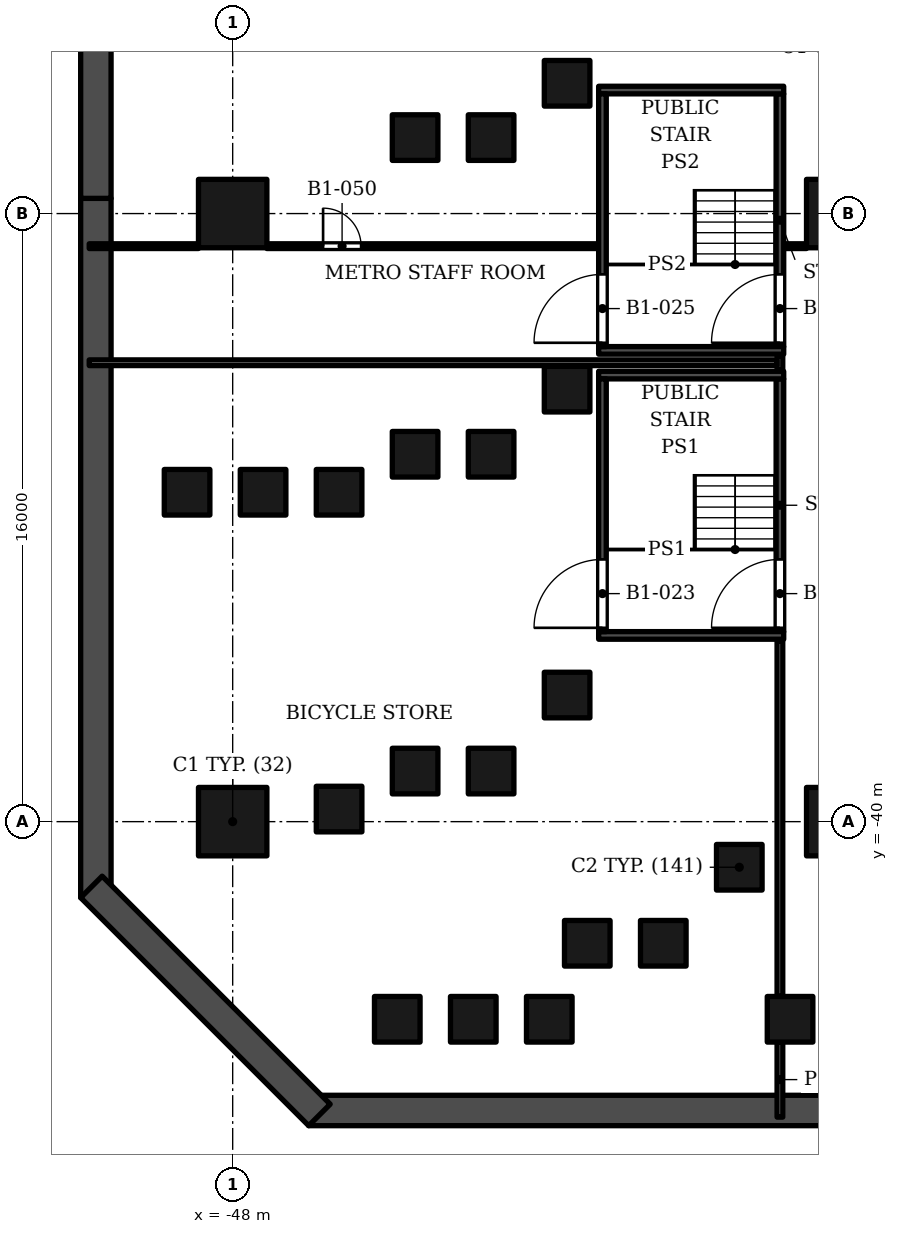
"""IFC4 building model, lengths in metres.
Left out: names, types, materials, properties, quantities, classifications, styles, units other than length and angle.
Written with IfcOpenShell. Run it as: python <this file> out.ifc"""

import sys

from ifc_helpers import new_model, si_unit, direction, frame, frame_2d, origin, origin_2d, place, context, subcontext, project, spatial, rectangle, extrude, element, fill, save


model = new_model("IFC4")
c1 = context("Model", 3, precision=1e-05, world=origin(), true_north=direction((0.0, 1.0)))
c2 = subcontext(c1, "Body", "Model", "MODEL_VIEW")
j1 = project(units=[si_unit("LENGTHUNIT", "METRE"), si_unit("PLANEANGLEUNIT", "RADIAN")], contexts=[c1])
p1 = place(None, origin())
s1 = spatial("IfcSite", under=j1, at=p1, CompositionType="ELEMENT")
p2 = place(p1, origin())
s2 = spatial("IfcBuilding", under=s1, at=p2, CompositionType="ELEMENT")
p3 = place(p2, frame((0.0, 0.0, -5.0)))
s3 = spatial("IfcBuildingStorey", under=s2, at=p3, CompositionType="ELEMENT", Elevation=-5.0)
p4 = place(p3, frame((-51.6, -23.6, 0.0), z_axis=(0.0, 0.0, 1.0), x_axis=(0.0, 1.0, 0.0)))
e1 = element("IfcWall", 1, at=p4, inside=s3, PredefinedType="SHEAR", context=c2, shape_type="SweptSolid", body=[
    extrude(rectangle(XDim=12.0, YDim=0.8, at=frame_2d((6.0, 0.0))), origin(), (0.0, 0.0, 1.0), 5.0),
])
p5 = place(p4, frame((4.0, 0.0, 0.0)))
e2 = element("IfcOpeningElement", 2, at=p5, cuts=e1, PredefinedType="OPENING", context=c2, shape_type="SweptSolid", body=[
    extrude(rectangle(XDim=4.0, YDim=2.5, at=frame_2d((2.0, 1.25))), frame((0.0, 0.41, 0.0), z_axis=(0.0, -1.0, 0.0), x_axis=(1.0, 0.0, 0.0)), (0.0, 0.0, 1.0), 0.82),
])
p6 = place(p3, frame((-51.6, -23.6, 0.0), z_axis=(0.0, 0.0, 1.0), x_axis=(0.0, -1.0, 0.0)))
e3 = element("IfcWall", 3, at=p6, inside=s3, PredefinedType="SHEAR", context=c2, shape_type="SweptSolid", body=[
    extrude(rectangle(XDim=18.4, YDim=0.8, at=frame_2d((9.2, 0.0))), origin(), (0.0, 0.0, 1.0), 5.0),
])
p7 = place(p3, frame((-51.717, -41.717, 0.0), z_axis=(0.0, 0.0, 1.0), x_axis=(0.707106781187, -0.707106781187, 0.0)))
e4 = element("IfcWall", 4, at=p7, inside=s3, PredefinedType="SHEAR", context=c2, shape_type="SweptSolid", body=[
    extrude(rectangle(XDim=8.485, YDim=0.8, at=frame_2d((4.243, 0.0))), origin(), (0.0, 0.0, 1.0), 5.0),
])
p8 = place(p3, frame((-46.0, -47.6, 0.0), z_axis=(0.0, 0.0, 1.0), x_axis=(1.0, 0.0, 0.0)))
e5 = element("IfcWall", 5, at=p8, inside=s3, PredefinedType="SHEAR", context=c2, shape_type="SweptSolid", body=[
    extrude(rectangle(XDim=92.0, YDim=0.8, at=frame_2d((46.0, 0.0))), origin(), (0.0, 0.0, 1.0), 5.0),
])
for number, where, z_axis, x_axis in (
    (6, (-48.0, -40.0, 0.0), (0.0, 0.0, 1.0), (1.0, 0.0, 0.0)),
    (7, (-48.0, -24.0, 0.0), (0.0, 0.0, 1.0), (1.0, 0.0, 0.0)),
    (8, (-32.0, -40.0, 0.0), (0.0, 0.0, 1.0), (1.0, 0.0, 0.0)),
    (9, (-32.0, -24.0, 0.0), (0.0, 0.0, 1.0), (1.0, 0.0, 0.0)),
):
    element("IfcColumn", number, at=place(p3, frame(where, z_axis=z_axis, x_axis=x_axis)), inside=s3, PredefinedType="COLUMN", context=c2, shape_type="SweptSolid", body=[
        extrude(rectangle(XDim=1.8, YDim=1.8, at=origin_2d()), origin(), (0.0, 0.0, 1.0), 5.0),
    ])
for number, where, z_axis, x_axis in (
    (10, (-34.669, -41.2, 0.0), (0.0, 0.0, 1.0), (1.0, 0.0, 0.0)),
    (11, (-39.2, -36.669, 0.0), (0.0, 0.0, 1.0), (1.0, 0.0, 0.0)),
    (12, (-39.2, -28.62, 0.0), (0.0, 0.0, 1.0), (1.0, 0.0, 0.0)),
    (13, (-39.2, -20.572, 0.0), (0.0, 0.0, 1.0), (1.0, 0.0, 0.0)),
    (14, (-36.669, -43.2, 0.0), (0.0, 0.0, 1.0), (1.0, 0.0, 0.0)),
    (15, (-41.2, -38.669, 0.0), (0.0, 0.0, 1.0), (1.0, 0.0, 0.0)),
    (16, (-41.2, -30.333, 0.0), (0.0, 0.0, 1.0), (1.0, 0.0, 0.0)),
    (17, (-41.2, -22.001, 0.0), (0.0, 0.0, 1.0), (1.0, 0.0, 0.0)),
    (18, (-38.669, -43.2, 0.0), (0.0, 0.0, 1.0), (1.0, 0.0, 0.0)),
    (19, (-43.2, -38.669, 0.0), (0.0, 0.0, 1.0), (1.0, 0.0, 0.0)),
    (20, (-43.2, -30.333, 0.0), (0.0, 0.0, 1.0), (1.0, 0.0, 0.0)),
    (21, (-43.2, -22.001, 0.0), (0.0, 0.0, 1.0), (1.0, 0.0, 0.0)),
    (22, (-39.669, -45.2, 0.0), (0.0, 0.0, 1.0), (1.0, 0.0, 0.0)),
    (23, (-45.2, -39.669, 0.0), (0.0, 0.0, 1.0), (1.0, 0.0, 0.0)),
    (24, (-45.2, -31.333, 0.0), (0.0, 0.0, 1.0), (1.0, 0.0, 0.0)),
    (25, (-41.669, -45.2, 0.0), (0.0, 0.0, 1.0), (1.0, 0.0, 0.0)),
    (26, (-47.2, -31.333, 0.0), (0.0, 0.0, 1.0), (1.0, 0.0, 0.0)),
    (27, (-33.333, -45.2, 0.0), (0.0, 0.0, 1.0), (1.0, 0.0, 0.0)),
    (28, (-43.669, -45.2, 0.0), (0.0, 0.0, 1.0), (1.0, 0.0, 0.0)),
    (29, (-49.2, -31.333, 0.0), (0.0, 0.0, 1.0), (1.0, 0.0, 0.0)),
):
    element("IfcColumn", number, at=place(p3, frame(where, z_axis=z_axis, x_axis=x_axis)), inside=s3, PredefinedType="COLUMN", context=c2, shape_type="SweptSolid", body=[
        extrude(rectangle(XDim=1.2, YDim=1.2, at=origin_2d()), origin(), (0.0, 0.0, 1.0), 5.0),
    ])
for number, where, z_axis, x_axis in (
    (30, (-38.37, -35.1, 0.0), (0.0, 0.0, 1.0), (1.0, 0.0, 0.0)),
    (31, (-38.37, -28.25, 0.0), (0.0, 0.0, 1.0), (1.0, 0.0, 0.0)),
):
    element("IfcWall", number, at=place(p3, frame(where, z_axis=z_axis, x_axis=x_axis)), inside=s3, PredefinedType="SOLIDWALL", context=c2, shape_type="SweptSolid", body=[
        extrude(rectangle(XDim=4.87, YDim=0.2, at=frame_2d((2.435, 0.0))), origin(), (0.0, 0.0, 1.0), 4.45),
    ])
p9 = place(p3, frame((-38.27, -35.0, 0.0), z_axis=(0.0, 0.0, 1.0), x_axis=(0.0, 1.0, 0.0)))
e32 = element("IfcWall", 32, at=p9, inside=s3, PredefinedType="SOLIDWALL", context=c2, shape_type="SweptSolid", body=[
    extrude(rectangle(XDim=6.65, YDim=0.2, at=frame_2d((3.325, 0.0))), origin(), (0.0, 0.0, 1.0), 4.45),
])
p10 = place(p9, frame((0.1, 0.0, 0.0)))
e33 = element("IfcOpeningElement", 33, at=p10, cuts=e32, PredefinedType="OPENING", context=c2, shape_type="SweptSolid", body=[
    extrude(rectangle(XDim=1.8, YDim=2.4, at=frame_2d((0.9, 1.2))), frame((0.0, 0.11, 0.0), z_axis=(0.0, -1.0, 0.0), x_axis=(1.0, 0.0, 0.0)), (0.0, 0.0, 1.0), 0.22),
])
p11 = place(p3, frame((-33.6, -35.0, 0.0), z_axis=(0.0, 0.0, 1.0), x_axis=(0.0, 1.0, 0.0)))
e34 = element("IfcWall", 34, at=p11, inside=s3, PredefinedType="SOLIDWALL", context=c2, shape_type="SweptSolid", body=[
    extrude(rectangle(XDim=6.65, YDim=0.2, at=frame_2d((3.325, 0.0))), origin(), (0.0, 0.0, 1.0), 4.45),
])
p12 = place(p11, frame((0.1, 0.0, 0.0)))
e35 = element("IfcOpeningElement", 35, at=p12, cuts=e34, PredefinedType="OPENING", context=c2, shape_type="SweptSolid", body=[
    extrude(rectangle(XDim=1.8, YDim=2.4, at=frame_2d((0.9, 1.2))), frame((0.0, 0.11, 0.0), z_axis=(0.0, -1.0, 0.0), x_axis=(1.0, 0.0, 0.0)), (0.0, 0.0, 1.0), 0.22),
])
for number, where, z_axis, x_axis in (
    (36, (-38.37, -27.6, 0.0), (0.0, 0.0, 1.0), (1.0, 0.0, 0.0)),
    (37, (-38.37, -20.75, 0.0), (0.0, 0.0, 1.0), (1.0, 0.0, 0.0)),
):
    element("IfcWall", number, at=place(p3, frame(where, z_axis=z_axis, x_axis=x_axis)), inside=s3, PredefinedType="SOLIDWALL", context=c2, shape_type="SweptSolid", body=[
        extrude(rectangle(XDim=4.87, YDim=0.2, at=frame_2d((2.435, 0.0))), origin(), (0.0, 0.0, 1.0), 4.45),
    ])
p13 = place(p3, frame((-38.27, -27.5, 0.0), z_axis=(0.0, 0.0, 1.0), x_axis=(0.0, 1.0, 0.0)))
e38 = element("IfcWall", 38, at=p13, inside=s3, PredefinedType="SOLIDWALL", context=c2, shape_type="SweptSolid", body=[
    extrude(rectangle(XDim=6.65, YDim=0.2, at=frame_2d((3.325, 0.0))), origin(), (0.0, 0.0, 1.0), 4.45),
])
p14 = place(p13, frame((0.1, 0.0, 0.0)))
e39 = element("IfcOpeningElement", 39, at=p14, cuts=e38, PredefinedType="OPENING", context=c2, shape_type="SweptSolid", body=[
    extrude(rectangle(XDim=1.8, YDim=2.4, at=frame_2d((0.9, 1.2))), frame((0.0, 0.11, 0.0), z_axis=(0.0, -1.0, 0.0), x_axis=(1.0, 0.0, 0.0)), (0.0, 0.0, 1.0), 0.22),
])
p15 = place(p3, frame((-33.6, -27.5, 0.0), z_axis=(0.0, 0.0, 1.0), x_axis=(0.0, 1.0, 0.0)))
e40 = element("IfcWall", 40, at=p15, inside=s3, PredefinedType="SOLIDWALL", context=c2, shape_type="SweptSolid", body=[
    extrude(rectangle(XDim=6.65, YDim=0.2, at=frame_2d((3.325, 0.0))), origin(), (0.0, 0.0, 1.0), 4.45),
])
p16 = place(p15, frame((0.1, 0.0, 0.0)))
e41 = element("IfcOpeningElement", 41, at=p16, cuts=e40, PredefinedType="OPENING", context=c2, shape_type="SweptSolid", body=[
    extrude(rectangle(XDim=1.8, YDim=2.4, at=frame_2d((0.9, 1.2))), frame((0.0, 0.11, 0.0), z_axis=(0.0, -1.0, 0.0), x_axis=(1.0, 0.0, 0.0)), (0.0, 0.0, 1.0), 0.22),
])
p17 = place(p3, frame((-33.6, -47.775, 0.0), z_axis=(0.0, 0.0, 1.0), x_axis=(0.0, 1.0, 0.0)))
e42 = element("IfcWall", 42, at=p17, inside=s3, PredefinedType="PARTITIONING", context=c2, shape_type="SweptSolid", body=[
    extrude(rectangle(XDim=1.975, YDim=0.15, at=frame_2d((0.987, 0.0))), origin(), (0.0, 0.0, 1.0), 4.45),
])
p18 = place(p3, frame((-33.6, -44.6, 0.0), z_axis=(0.0, 0.0, 1.0), x_axis=(0.0, 1.0, 0.0)))
e43 = element("IfcWall", 43, at=p18, inside=s3, PredefinedType="PARTITIONING", context=c2, shape_type="SweptSolid", body=[
    extrude(rectangle(XDim=9.36, YDim=0.15, at=frame_2d((4.68, 0.0))), origin(), (0.0, 0.0, 1.0), 3.25),
])
p19 = place(p3, frame((-33.6, -28.11, 0.0), z_axis=(0.0, 0.0, 1.0), x_axis=(0.0, 1.0, 0.0)))
e44 = element("IfcWall", 44, at=p19, inside=s3, PredefinedType="PARTITIONING", context=c2, shape_type="SweptSolid", body=[
    extrude(rectangle(XDim=0.37, YDim=0.15, at=frame_2d((0.185, 0.0))), origin(), (0.0, 0.0, 1.0), 4.45),
])
p20 = place(p3, frame((-51.775, -27.925, 0.0), z_axis=(0.0, 0.0, 1.0), x_axis=(1.0, 0.0, 0.0)))
e45 = element("IfcWall", 45, at=p20, inside=s3, PredefinedType="PARTITIONING", context=c2, shape_type="SweptSolid", body=[
    extrude(rectangle(XDim=18.1, YDim=0.15, at=frame_2d((9.05, 0.0))), origin(), (0.0, 0.0, 1.0), 3.55),
])
p21 = place(p3, frame((-51.775, -24.857, 0.0), z_axis=(0.0, 0.0, 1.0), x_axis=(1.0, 0.0, 0.0)))
e46 = element("IfcWall", 46, at=p21, inside=s3, PredefinedType="PARTITIONING", context=c2, shape_type="SweptSolid", body=[
    extrude(rectangle(XDim=2.875, YDim=0.125, at=frame_2d((1.438, 0.0))), origin(), (0.0, 0.0, 1.0), 3.55),
])
p22 = place(p3, frame((-47.1, -24.857, 0.0), z_axis=(0.0, 0.0, 1.0), x_axis=(1.0, 0.0, 0.0)))
e47 = element("IfcWall", 47, at=p22, inside=s3, PredefinedType="PARTITIONING", context=c2, shape_type="SweptSolid", body=[
    extrude(rectangle(XDim=8.69, YDim=0.125, at=frame_2d((4.345, 0.0))), origin(), (0.0, 0.0, 1.0), 4.45),
])
p23 = place(p22, frame((1.479, 0.0, 0.0)))
e48 = element("IfcOpeningElement", 48, at=p23, cuts=e47, PredefinedType="OPENING", context=c2, shape_type="SweptSolid", body=[
    extrude(rectangle(XDim=1.0, YDim=2.1, at=frame_2d((0.5, 1.05))), frame((0.0, 0.073, 0.0), z_axis=(0.0, -1.0, 0.0), x_axis=(1.0, 0.0, 0.0)), (0.0, 0.0, 1.0), 0.145),
])
p24 = place(p3, frame((-33.46, -24.857, 0.0), z_axis=(0.0, 0.0, 1.0), x_axis=(1.0, 0.0, 0.0)))
e49 = element("IfcWall", 49, at=p24, inside=s3, PredefinedType="PARTITIONING", context=c2, shape_type="SweptSolid", body=[
    extrude(rectangle(XDim=0.56, YDim=0.125, at=frame_2d((0.28, 0.0))), origin(), (0.0, 0.0, 1.0), 4.45),
])
p25 = place(p12, origin())
e50 = element("IfcDoor", 50, at=p25, inside=s3, OperationType="DOUBLE_DOOR_SINGLE_SWING", PredefinedType="DOOR", context=c2, shape_type="SweptSolid", body=[
    extrude(rectangle(XDim=1.8, YDim=2.4, at=frame_2d((0.9, 1.2))), frame((0.0, 0.025, 0.0), z_axis=(0.0, -1.0, 0.0), x_axis=(1.0, 0.0, 0.0)), (0.0, 0.0, 1.0), 0.05),
])
fill(e35, e50)
p26 = place(p10, origin())
e51 = element("IfcDoor", 51, at=p26, inside=s3, OperationType="DOUBLE_DOOR_SINGLE_SWING", PredefinedType="DOOR", context=c2, shape_type="SweptSolid", body=[
    extrude(rectangle(XDim=1.8, YDim=2.4, at=frame_2d((0.9, 1.2))), frame((0.0, 0.025, 0.0), z_axis=(0.0, -1.0, 0.0), x_axis=(1.0, 0.0, 0.0)), (0.0, 0.0, 1.0), 0.05),
])
fill(e33, e51)
p27 = place(p16, origin())
e52 = element("IfcDoor", 52, at=p27, inside=s3, OperationType="DOUBLE_DOOR_SINGLE_SWING", PredefinedType="DOOR", context=c2, shape_type="SweptSolid", body=[
    extrude(rectangle(XDim=1.8, YDim=2.4, at=frame_2d((0.9, 1.2))), frame((0.0, 0.025, 0.0), z_axis=(0.0, -1.0, 0.0), x_axis=(1.0, 0.0, 0.0)), (0.0, 0.0, 1.0), 0.05),
])
fill(e41, e52)
p28 = place(p14, origin())
e53 = element("IfcDoor", 53, at=p28, inside=s3, OperationType="DOUBLE_DOOR_SINGLE_SWING", PredefinedType="DOOR", context=c2, shape_type="SweptSolid", body=[
    extrude(rectangle(XDim=1.8, YDim=2.4, at=frame_2d((0.9, 1.2))), frame((0.0, 0.025, 0.0), z_axis=(0.0, -1.0, 0.0), x_axis=(1.0, 0.0, 0.0)), (0.0, 0.0, 1.0), 0.05),
])
fill(e39, e53)
p29 = place(p23, origin())
e54 = element("IfcDoor", 54, at=p29, inside=s3, OperationType="SINGLE_SWING_LEFT", PredefinedType="DOOR", context=c2, shape_type="SweptSolid", body=[
    extrude(rectangle(XDim=1.0, YDim=2.1, at=frame_2d((0.5, 1.05))), frame((0.0, 0.025, 0.0), z_axis=(0.0, -1.0, 0.0), x_axis=(1.0, 0.0, 0.0)), (0.0, 0.0, 1.0), 0.05),
])
fill(e48, e54)
save(model, sys.argv[1])
